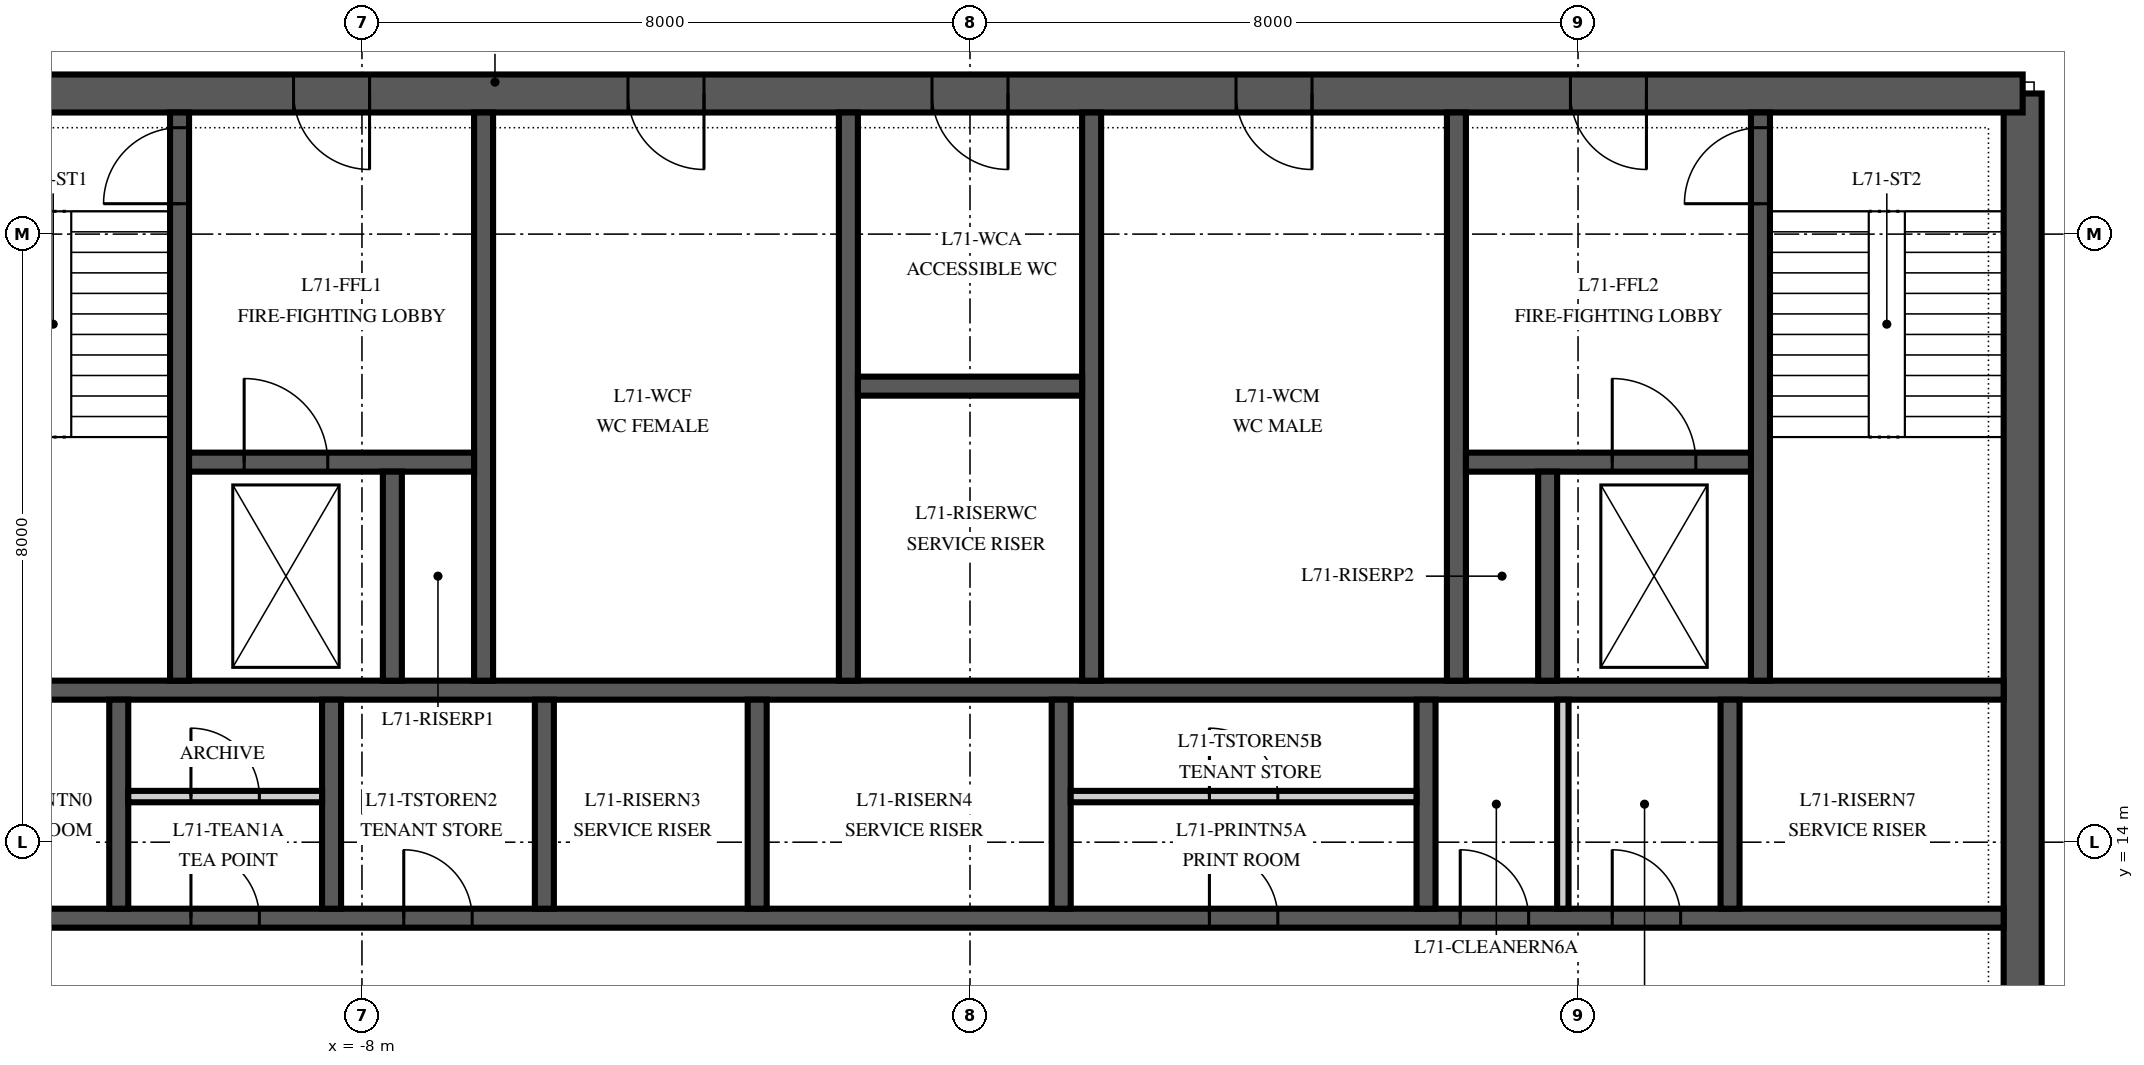
"""IFC4 building model, lengths in metres.
Left out: names, types, materials, properties, quantities, classifications, styles, units other than length and angle.
Written with IfcOpenShell. Run it as: python <this file> out.ifc"""

import sys

from ifc_helpers import new_model, si_unit, direction, frame, frame_2d, origin, place, context, subcontext, project, spatial, polyline, rectangle, outline, extrude, element, fill, save


model = new_model("IFC4")
c1 = context("Model", 3, precision=1e-05, world=origin(), true_north=direction((0.0, 1.0)))
c2 = subcontext(c1, "Body", "Model", "MODEL_VIEW")
j1 = project(units=[si_unit("LENGTHUNIT", "METRE"), si_unit("PLANEANGLEUNIT", "RADIAN")], contexts=[c1])
p1 = place(None, origin())
s1 = spatial("IfcSite", under=j1, at=p1, CompositionType="ELEMENT")
p2 = place(p1, origin())
s2 = spatial("IfcBuilding", under=s1, at=p2, CompositionType="ELEMENT")
p3 = place(p2, frame((0.0, 0.0, 304.0)))
s3 = spatial("IfcBuildingStorey", under=s2, at=p3, CompositionType="ELEMENT", Elevation=304.0)
p4 = place(p3, frame((13.85, 6.15, 0.0), z_axis=(0.0, 0.0, 1.0), x_axis=(0.0, 1.0, 0.0)))
e1 = element("IfcWall", 1, at=p4, inside=s3, PredefinedType="SHEAR", context=c2, shape_type="SweptSolid", body=[
    extrude(outline(polyline([(0.0, -0.25), (17.7, -0.25), (17.7, 0.0), (17.45, 0.0), (17.45, 0.25), (0.25, 0.25), (0.25, 0.0), (0.0, 0.0), (0.0, -0.25)])), origin(), (0.0, 0.0, 1.0), 4.0),
])
p5 = place(p4, frame((4.15, 0.0, 0.0)))
e2 = element("IfcOpeningElement", 2, at=p5, cuts=e1, PredefinedType="OPENING", context=c2, shape_type="SweptSolid", body=[
    extrude(rectangle(XDim=1.8, YDim=2.4, at=frame_2d((0.9, 1.2))), frame((0.0, 0.265, 0.0), z_axis=(0.0, -1.0, 0.0), x_axis=(1.0, 0.0, 0.0)), (0.0, 0.0, 1.0), 0.53),
])
p6 = place(p3, frame((13.85, 23.85, 0.0), z_axis=(0.0, 0.0, 1.0), x_axis=(-1.0, 0.0, 0.0)))
e3 = element("IfcWall", 3, at=p6, inside=s3, PredefinedType="SHEAR", context=c2, shape_type="SweptSolid", body=[
    extrude(rectangle(XDim=27.7, YDim=0.5, at=frame_2d((13.85, 0.0))), origin(), (0.0, 0.0, 1.0), 4.0),
])
p7 = place(p6, frame((21.75, 0.0, 0.0)))
e4 = element("IfcOpeningElement", 4, at=p7, cuts=e3, PredefinedType="OPENING", context=c2, shape_type="SweptSolid", body=[
    extrude(rectangle(XDim=1.0, YDim=2.1, at=frame_2d((0.5, 1.05))), frame((0.0, 0.265, 0.0), z_axis=(0.0, -1.0, 0.0), x_axis=(1.0, 0.0, 0.0)), (0.0, 0.0, 1.0), 0.53),
])
p8 = place(p6, frame((4.95, 0.0, 0.0)))
e5 = element("IfcOpeningElement", 5, at=p8, cuts=e3, PredefinedType="OPENING", context=c2, shape_type="SweptSolid", body=[
    extrude(rectangle(XDim=1.0, YDim=2.1, at=frame_2d((0.5, 1.05))), frame((0.0, 0.265, 0.0), z_axis=(0.0, -1.0, 0.0), x_axis=(1.0, 0.0, 0.0)), (0.0, 0.0, 1.0), 0.53),
])
p9 = place(p6, frame((17.35, 0.0, 0.0)))
e6 = element("IfcOpeningElement", 6, at=p9, cuts=e3, PredefinedType="OPENING", context=c2, shape_type="SweptSolid", body=[
    extrude(rectangle(XDim=1.0, YDim=2.1, at=frame_2d((0.5, 1.05))), frame((0.0, 0.265, 0.0), z_axis=(0.0, -1.0, 0.0), x_axis=(1.0, 0.0, 0.0)), (0.0, 0.0, 1.0), 0.53),
])
p10 = place(p6, frame((13.35, 0.0, 0.0)))
e7 = element("IfcOpeningElement", 7, at=p10, cuts=e3, PredefinedType="OPENING", context=c2, shape_type="SweptSolid", body=[
    extrude(rectangle(XDim=1.0, YDim=2.1, at=frame_2d((0.5, 1.05))), frame((0.0, 0.265, 0.0), z_axis=(0.0, -1.0, 0.0), x_axis=(1.0, 0.0, 0.0)), (0.0, 0.0, 1.0), 0.53),
])
p11 = place(p6, frame((9.35, 0.0, 0.0)))
e8 = element("IfcOpeningElement", 8, at=p11, cuts=e3, PredefinedType="OPENING", context=c2, shape_type="SweptSolid", body=[
    extrude(rectangle(XDim=1.0, YDim=2.1, at=frame_2d((0.5, 1.05))), frame((0.0, 0.265, 0.0), z_axis=(0.0, -1.0, 0.0), x_axis=(1.0, 0.0, 0.0)), (0.0, 0.0, 1.0), 0.53),
])
p12 = place(p3, frame((-13.6, 13.0, 0.0), z_axis=(0.0, 0.0, 1.0), x_axis=(1.0, 0.0, 0.0)))
e9 = element("IfcWall", 9, at=p12, inside=s3, PredefinedType="SHEAR", context=c2, shape_type="SweptSolid", body=[
    extrude(rectangle(XDim=27.2, YDim=0.25, at=frame_2d((13.6, 0.0))), origin(), (0.0, 0.0, 1.0), 4.0),
])
p13 = place(p12, frame((16.75, 0.0, 0.0)))
e10 = element("IfcOpeningElement", 10, at=p13, cuts=e9, PredefinedType="OPENING", context=c2, shape_type="SweptSolid", body=[
    extrude(rectangle(XDim=0.9, YDim=2.1, at=frame_2d((0.45, 1.05))), frame((0.0, 0.14, 0.0), z_axis=(0.0, -1.0, 0.0), x_axis=(1.0, 0.0, 0.0)), (0.0, 0.0, 1.0), 0.28),
])
p14 = place(p12, frame((20.05, 0.0, 0.0)))
e11 = element("IfcOpeningElement", 11, at=p14, cuts=e9, PredefinedType="OPENING", context=c2, shape_type="SweptSolid", body=[
    extrude(rectangle(XDim=0.9, YDim=2.1, at=frame_2d((0.45, 1.05))), frame((0.0, 0.14, 0.0), z_axis=(0.0, -1.0, 0.0), x_axis=(1.0, 0.0, 0.0)), (0.0, 0.0, 1.0), 0.28),
])
p15 = place(p12, frame((22.05, 0.0, 0.0)))
e12 = element("IfcOpeningElement", 12, at=p15, cuts=e9, PredefinedType="OPENING", context=c2, shape_type="SweptSolid", body=[
    extrude(rectangle(XDim=0.9, YDim=2.1, at=frame_2d((0.45, 1.05))), frame((0.0, 0.14, 0.0), z_axis=(0.0, -1.0, 0.0), x_axis=(1.0, 0.0, 0.0)), (0.0, 0.0, 1.0), 0.28),
])
p16 = place(p12, frame((0.55, 0.0, 0.0)))
e13 = element("IfcOpeningElement", 13, at=p16, cuts=e9, PredefinedType="OPENING", context=c2, shape_type="SweptSolid", body=[
    extrude(rectangle(XDim=0.9, YDim=2.1, at=frame_2d((0.45, 1.05))), frame((0.0, 0.14, 0.0), z_axis=(0.0, -1.0, 0.0), x_axis=(1.0, 0.0, 0.0)), (0.0, 0.0, 1.0), 0.28),
])
p17 = place(p12, frame((3.35, 0.0, 0.0)))
e14 = element("IfcOpeningElement", 14, at=p17, cuts=e9, PredefinedType="OPENING", context=c2, shape_type="SweptSolid", body=[
    extrude(rectangle(XDim=0.9, YDim=2.1, at=frame_2d((0.45, 1.05))), frame((0.0, 0.14, 0.0), z_axis=(0.0, -1.0, 0.0), x_axis=(1.0, 0.0, 0.0)), (0.0, 0.0, 1.0), 0.28),
])
p18 = place(p12, frame((6.15, 0.0, 0.0)))
e15 = element("IfcOpeningElement", 15, at=p18, cuts=e9, PredefinedType="OPENING", context=c2, shape_type="SweptSolid", body=[
    extrude(rectangle(XDim=0.9, YDim=2.1, at=frame_2d((0.45, 1.05))), frame((0.0, 0.14, 0.0), z_axis=(0.0, -1.0, 0.0), x_axis=(1.0, 0.0, 0.0)), (0.0, 0.0, 1.0), 0.28),
])
p19 = place(p3, frame((-13.6, 16.0, 0.0), z_axis=(0.0, 0.0, 1.0), x_axis=(1.0, 0.0, 0.0)))
e16 = element("IfcWall", 16, at=p19, inside=s3, PredefinedType="SHEAR", context=c2, shape_type="SweptSolid", body=[
    extrude(rectangle(XDim=27.2, YDim=0.25, at=frame_2d((13.6, 0.0))), origin(), (0.0, 0.0, 1.0), 4.0),
])
for number, where, z_axis, x_axis in (
    (17, (-11.2, 13.125, 0.0), (0.0, 0.0, 1.0), (0.0, 1.0, 0.0)),
    (18, (-8.4, 13.125, 0.0), (0.0, 0.0, 1.0), (0.0, 1.0, 0.0)),
    (19, (-5.6, 13.125, 0.0), (0.0, 0.0, 1.0), (0.0, 1.0, 0.0)),
    (20, (-2.8, 13.125, 0.0), (0.0, 0.0, 1.0), (0.0, 1.0, 0.0)),
    (21, (1.2, 13.125, 0.0), (0.0, 0.0, 1.0), (0.0, 1.0, 0.0)),
    (22, (6.0, 13.125, 0.0), (0.0, 0.0, 1.0), (0.0, 1.0, 0.0)),
    (23, (10.0, 13.125, 0.0), (0.0, 0.0, 1.0), (0.0, 1.0, 0.0)),
):
    element("IfcWall", number, at=place(p3, frame(where, z_axis=z_axis, x_axis=x_axis)), inside=s3, PredefinedType="SHEAR", context=c2, shape_type="SweptSolid", body=[
        extrude(rectangle(XDim=2.75, YDim=0.25, at=frame_2d((1.375, 0.0))), origin(), (0.0, 0.0, 1.0), 4.0),
    ])
p20 = place(p3, frame((-10.4, 16.125, 0.0), z_axis=(0.0, 0.0, 1.0), x_axis=(0.0, 1.0, 0.0)))
e24 = element("IfcWall", 24, at=p20, inside=s3, PredefinedType="SHEAR", context=c2, shape_type="SweptSolid", body=[
    extrude(rectangle(XDim=7.475, YDim=0.25, at=frame_2d((3.738, 0.0))), origin(), (0.0, 0.0, 1.0), 4.0),
])
p21 = place(p20, frame((6.275, 0.0, 0.0)))
e25 = element("IfcOpeningElement", 25, at=p21, cuts=e24, PredefinedType="OPENING", context=c2, shape_type="SweptSolid", body=[
    extrude(rectangle(XDim=1.0, YDim=2.1, at=frame_2d((0.5, 1.05))), frame((0.0, 0.14, 0.0), z_axis=(0.0, -1.0, 0.0), x_axis=(1.0, 0.0, 0.0)), (0.0, 0.0, 1.0), 0.28),
])
for number, where, z_axis, x_axis in (
    (26, (-6.4, 16.125, 0.0), (0.0, 0.0, 1.0), (0.0, 1.0, 0.0)),
    (27, (-1.6, 16.125, 0.0), (0.0, 0.0, 1.0), (0.0, 1.0, 0.0)),
    (28, (1.6, 16.125, 0.0), (0.0, 0.0, 1.0), (0.0, 1.0, 0.0)),
    (29, (6.4, 16.125, 0.0), (0.0, 0.0, 1.0), (0.0, 1.0, 0.0)),
):
    element("IfcWall", number, at=place(p3, frame(where, z_axis=z_axis, x_axis=x_axis)), inside=s3, PredefinedType="SHEAR", context=c2, shape_type="SweptSolid", body=[
        extrude(rectangle(XDim=7.475, YDim=0.25, at=frame_2d((3.738, 0.0))), origin(), (0.0, 0.0, 1.0), 4.0),
    ])
p22 = place(p3, frame((10.4, 16.125, 0.0), z_axis=(0.0, 0.0, 1.0), x_axis=(0.0, 1.0, 0.0)))
e30 = element("IfcWall", 30, at=p22, inside=s3, PredefinedType="SHEAR", context=c2, shape_type="SweptSolid", body=[
    extrude(rectangle(XDim=7.475, YDim=0.25, at=frame_2d((3.738, 0.0))), origin(), (0.0, 0.0, 1.0), 4.0),
])
p23 = place(p22, frame((6.275, 0.0, 0.0)))
e31 = element("IfcOpeningElement", 31, at=p23, cuts=e30, PredefinedType="OPENING", context=c2, shape_type="SweptSolid", body=[
    extrude(rectangle(XDim=1.0, YDim=2.1, at=frame_2d((0.5, 1.05))), frame((0.0, 0.14, 0.0), z_axis=(0.0, -1.0, 0.0), x_axis=(1.0, 0.0, 0.0)), (0.0, 0.0, 1.0), 0.28),
])
p24 = place(p3, frame((-10.275, 19.0, 0.0), z_axis=(0.0, 0.0, 1.0), x_axis=(1.0, 0.0, 0.0)))
e32 = element("IfcWall", 32, at=p24, inside=s3, PredefinedType="SHEAR", context=c2, shape_type="SweptSolid", body=[
    extrude(rectangle(XDim=3.75, YDim=0.25, at=frame_2d((1.875, 0.0))), origin(), (0.0, 0.0, 1.0), 4.0),
])
p25 = place(p24, frame((0.725, 0.0, 0.0)))
e33 = element("IfcOpeningElement", 33, at=p25, cuts=e32, PredefinedType="OPENING", context=c2, shape_type="SweptSolid", body=[
    extrude(rectangle(XDim=1.1, YDim=2.1, at=frame_2d((0.55, 1.05))), frame((0.0, 0.14, 0.0), z_axis=(0.0, -1.0, 0.0), x_axis=(1.0, 0.0, 0.0)), (0.0, 0.0, 1.0), 0.28),
])
p26 = place(p3, frame((6.525, 19.0, 0.0), z_axis=(0.0, 0.0, 1.0), x_axis=(1.0, 0.0, 0.0)))
e34 = element("IfcWall", 34, at=p26, inside=s3, PredefinedType="SHEAR", context=c2, shape_type="SweptSolid", body=[
    extrude(rectangle(XDim=3.75, YDim=0.25, at=frame_2d((1.875, 0.0))), origin(), (0.0, 0.0, 1.0), 4.0),
])
p27 = place(p26, frame((1.925, 0.0, 0.0)))
e35 = element("IfcOpeningElement", 35, at=p27, cuts=e34, PredefinedType="OPENING", context=c2, shape_type="SweptSolid", body=[
    extrude(rectangle(XDim=1.1, YDim=2.1, at=frame_2d((0.55, 1.05))), frame((0.0, 0.14, 0.0), z_axis=(0.0, -1.0, 0.0), x_axis=(1.0, 0.0, 0.0)), (0.0, 0.0, 1.0), 0.28),
])
for number, where, z_axis, x_axis in (
    (36, (-7.6, 16.125, 0.0), (0.0, 0.0, 1.0), (0.0, 1.0, 0.0)),
    (37, (7.6, 16.125, 0.0), (0.0, 0.0, 1.0), (0.0, 1.0, 0.0)),
):
    element("IfcWall", number, at=place(p3, frame(where, z_axis=z_axis, x_axis=x_axis)), inside=s3, PredefinedType="SHEAR", context=c2, shape_type="SweptSolid", body=[
        extrude(rectangle(XDim=2.75, YDim=0.25, at=frame_2d((1.375, 0.0))), origin(), (0.0, 0.0, 1.0), 4.0),
    ])
p28 = place(p3, frame((-1.475, 20.0, 0.0), z_axis=(0.0, 0.0, 1.0), x_axis=(1.0, 0.0, 0.0)))
e38 = element("IfcWall", 38, at=p28, inside=s3, PredefinedType="SHEAR", context=c2, shape_type="SweptSolid", body=[
    extrude(rectangle(XDim=2.95, YDim=0.25, at=frame_2d((1.475, 0.0))), origin(), (0.0, 0.0, 1.0), 4.0),
])
p29 = place(p3, frame((1.325, 14.6, 0.0), z_axis=(0.0, 0.0, 1.0), x_axis=(1.0, 0.0, 0.0)))
e39 = element("IfcWall", 39, at=p29, inside=s3, PredefinedType="PARTITIONING", context=c2, shape_type="SweptSolid", body=[
    extrude(rectangle(XDim=4.55, YDim=0.15, at=frame_2d((2.275, 0.0))), origin(), (0.0, 0.0, 1.0), 3.85),
])
p30 = place(p29, frame((1.825, 0.0, 0.0)))
e40 = element("IfcOpeningElement", 40, at=p30, cuts=e39, PredefinedType="OPENING", context=c2, shape_type="SweptSolid", body=[
    extrude(rectangle(XDim=0.9, YDim=2.1, at=frame_2d((0.45, 1.05))), frame((0.0, 0.09, 0.0), z_axis=(0.0, -1.0, 0.0), x_axis=(1.0, 0.0, 0.0)), (0.0, 0.0, 1.0), 0.18),
])
p31 = place(p3, frame((7.8, 13.125, 0.0), z_axis=(0.0, 0.0, 1.0), x_axis=(0.0, 1.0, 0.0)))
e41 = element("IfcWall", 41, at=p31, inside=s3, PredefinedType="PARTITIONING", context=c2, shape_type="SweptSolid", body=[
    extrude(rectangle(XDim=2.75, YDim=0.15, at=frame_2d((1.375, 0.0))), origin(), (0.0, 0.0, 1.0), 3.85),
])
p32 = place(p3, frame((-11.075, 14.6, 0.0), z_axis=(0.0, 0.0, 1.0), x_axis=(1.0, 0.0, 0.0)))
e42 = element("IfcWall", 42, at=p32, inside=s3, PredefinedType="PARTITIONING", context=c2, shape_type="SweptSolid", body=[
    extrude(rectangle(XDim=2.55, YDim=0.15, at=frame_2d((1.275, 0.0))), origin(), (0.0, 0.0, 1.0), 3.85),
])
p33 = place(p32, frame((0.825, 0.0, 0.0)))
e43 = element("IfcOpeningElement", 43, at=p33, cuts=e42, PredefinedType="OPENING", context=c2, shape_type="SweptSolid", body=[
    extrude(rectangle(XDim=0.9, YDim=2.1, at=frame_2d((0.45, 1.05))), frame((0.0, 0.09, 0.0), z_axis=(0.0, -1.0, 0.0), x_axis=(1.0, 0.0, 0.0)), (0.0, 0.0, 1.0), 0.18),
])
p34 = place(p7, origin())
e44 = element("IfcDoor", 44, at=p34, inside=s3, OperationType="SINGLE_SWING_RIGHT", PredefinedType="DOOR", context=c2, shape_type="SweptSolid", body=[
    extrude(rectangle(XDim=1.0, YDim=2.1, at=frame_2d((0.5, 1.05))), frame((0.0, 0.25, 0.0), z_axis=(0.0, -1.0, 0.0), x_axis=(1.0, 0.0, 0.0)), (0.0, 0.0, 1.0), 0.5),
])
fill(e4, e44)
p35 = place(p8, origin())
e45 = element("IfcDoor", 45, at=p35, inside=s3, OperationType="SINGLE_SWING_RIGHT", PredefinedType="DOOR", context=c2, shape_type="SweptSolid", body=[
    extrude(rectangle(XDim=1.0, YDim=2.1, at=frame_2d((0.5, 1.05))), frame((0.0, 0.25, 0.0), z_axis=(0.0, -1.0, 0.0), x_axis=(1.0, 0.0, 0.0)), (0.0, 0.0, 1.0), 0.5),
])
fill(e5, e45)
p36 = place(p9, origin())
e46 = element("IfcDoor", 46, at=p36, inside=s3, OperationType="SINGLE_SWING_LEFT", PredefinedType="DOOR", context=c2, shape_type="SweptSolid", body=[
    extrude(rectangle(XDim=1.0, YDim=2.1, at=frame_2d((0.5, 1.05))), frame((0.0, 0.25, 0.0), z_axis=(0.0, -1.0, 0.0), x_axis=(1.0, 0.0, 0.0)), (0.0, 0.0, 1.0), 0.5),
])
fill(e6, e46)
p37 = place(p10, origin())
e47 = element("IfcDoor", 47, at=p37, inside=s3, OperationType="SINGLE_SWING_LEFT", PredefinedType="DOOR", context=c2, shape_type="SweptSolid", body=[
    extrude(rectangle(XDim=1.0, YDim=2.1, at=frame_2d((0.5, 1.05))), frame((0.0, 0.25, 0.0), z_axis=(0.0, -1.0, 0.0), x_axis=(1.0, 0.0, 0.0)), (0.0, 0.0, 1.0), 0.5),
])
fill(e7, e47)
p38 = place(p11, origin())
e48 = element("IfcDoor", 48, at=p38, inside=s3, OperationType="SINGLE_SWING_LEFT", PredefinedType="DOOR", context=c2, shape_type="SweptSolid", body=[
    extrude(rectangle(XDim=1.0, YDim=2.1, at=frame_2d((0.5, 1.05))), frame((0.0, 0.25, 0.0), z_axis=(0.0, -1.0, 0.0), x_axis=(1.0, 0.0, 0.0)), (0.0, 0.0, 1.0), 0.5),
])
fill(e8, e48)
p39 = place(p21, origin())
e49 = element("IfcDoor", 49, at=p39, inside=s3, OperationType="SINGLE_SWING_LEFT", PredefinedType="DOOR", context=c2, shape_type="SweptSolid", body=[
    extrude(rectangle(XDim=1.0, YDim=2.1, at=frame_2d((0.5, 1.05))), frame((0.0, 0.125, 0.0), z_axis=(0.0, -1.0, 0.0), x_axis=(1.0, 0.0, 0.0)), (0.0, 0.0, 1.0), 0.25),
])
fill(e25, e49)
p40 = place(p23, origin())
e50 = element("IfcDoor", 50, at=p40, inside=s3, OperationType="SINGLE_SWING_LEFT", PredefinedType="DOOR", context=c2, shape_type="SweptSolid", body=[
    extrude(rectangle(XDim=1.0, YDim=2.1, at=frame_2d((0.5, 1.05))), frame((0.0, 0.125, 0.0), z_axis=(0.0, -1.0, 0.0), x_axis=(1.0, 0.0, 0.0)), (0.0, 0.0, 1.0), 0.25),
])
fill(e31, e50)
p41 = place(p27, origin())
e51 = element("IfcDoor", 51, at=p41, inside=s3, OperationType="SLIDING_TO_RIGHT", PredefinedType="DOOR", context=c2, shape_type="SweptSolid", body=[
    extrude(rectangle(XDim=1.1, YDim=2.1, at=frame_2d((0.55, 1.05))), frame((0.0, 0.125, 0.0), z_axis=(0.0, -1.0, 0.0), x_axis=(1.0, 0.0, 0.0)), (0.0, 0.0, 1.0), 0.25),
])
fill(e35, e51)
p42 = place(p25, origin())
e52 = element("IfcDoor", 52, at=p42, inside=s3, OperationType="SLIDING_TO_RIGHT", PredefinedType="DOOR", context=c2, shape_type="SweptSolid", body=[
    extrude(rectangle(XDim=1.1, YDim=2.1, at=frame_2d((0.55, 1.05))), frame((0.0, 0.125, 0.0), z_axis=(0.0, -1.0, 0.0), x_axis=(1.0, 0.0, 0.0)), (0.0, 0.0, 1.0), 0.25),
])
fill(e33, e52)
p43 = place(p13, origin())
e53 = element("IfcDoor", 53, at=p43, inside=s3, OperationType="SINGLE_SWING_LEFT", PredefinedType="DOOR", context=c2, shape_type="SweptSolid", body=[
    extrude(rectangle(XDim=0.9, YDim=2.1, at=frame_2d((0.45, 1.05))), frame((0.0, 0.125, 0.0), z_axis=(0.0, -1.0, 0.0), x_axis=(1.0, 0.0, 0.0)), (0.0, 0.0, 1.0), 0.25),
])
fill(e10, e53)
p44 = place(p30, origin())
e54 = element("IfcDoor", 54, at=p44, inside=s3, OperationType="SINGLE_SWING_LEFT", PredefinedType="DOOR", context=c2, shape_type="SweptSolid", body=[
    extrude(rectangle(XDim=0.9, YDim=2.1, at=frame_2d((0.45, 1.05))), frame((0.0, 0.075, 0.0), z_axis=(0.0, -1.0, 0.0), x_axis=(1.0, 0.0, 0.0)), (0.0, 0.0, 1.0), 0.149),
])
fill(e40, e54)
p45 = place(p14, origin())
e55 = element("IfcDoor", 55, at=p45, inside=s3, OperationType="SINGLE_SWING_LEFT", PredefinedType="DOOR", context=c2, shape_type="SweptSolid", body=[
    extrude(rectangle(XDim=0.9, YDim=2.1, at=frame_2d((0.45, 1.05))), frame((0.0, 0.125, 0.0), z_axis=(0.0, -1.0, 0.0), x_axis=(1.0, 0.0, 0.0)), (0.0, 0.0, 1.0), 0.25),
])
fill(e11, e55)
p46 = place(p15, origin())
e56 = element("IfcDoor", 56, at=p46, inside=s3, OperationType="SINGLE_SWING_LEFT", PredefinedType="DOOR", context=c2, shape_type="SweptSolid", body=[
    extrude(rectangle(XDim=0.9, YDim=2.1, at=frame_2d((0.45, 1.05))), frame((0.0, 0.125, 0.0), z_axis=(0.0, -1.0, 0.0), x_axis=(1.0, 0.0, 0.0)), (0.0, 0.0, 1.0), 0.25),
])
fill(e12, e56)
p47 = place(p17, origin())
e57 = element("IfcDoor", 57, at=p47, inside=s3, OperationType="SINGLE_SWING_LEFT", PredefinedType="DOOR", context=c2, shape_type="SweptSolid", body=[
    extrude(rectangle(XDim=0.9, YDim=2.1, at=frame_2d((0.45, 1.05))), frame((0.0, 0.125, 0.0), z_axis=(0.0, -1.0, 0.0), x_axis=(1.0, 0.0, 0.0)), (0.0, 0.0, 1.0), 0.25),
])
fill(e14, e57)
p48 = place(p33, origin())
e58 = element("IfcDoor", 58, at=p48, inside=s3, OperationType="SINGLE_SWING_LEFT", PredefinedType="DOOR", context=c2, shape_type="SweptSolid", body=[
    extrude(rectangle(XDim=0.9, YDim=2.1, at=frame_2d((0.45, 1.05))), frame((0.0, 0.075, 0.0), z_axis=(0.0, -1.0, 0.0), x_axis=(1.0, 0.0, 0.0)), (0.0, 0.0, 1.0), 0.149),
])
fill(e43, e58)
p49 = place(p18, origin())
e59 = element("IfcDoor", 59, at=p49, inside=s3, OperationType="SINGLE_SWING_LEFT", PredefinedType="DOOR", context=c2, shape_type="SweptSolid", body=[
    extrude(rectangle(XDim=0.9, YDim=2.1, at=frame_2d((0.45, 1.05))), frame((0.0, 0.125, 0.0), z_axis=(0.0, -1.0, 0.0), x_axis=(1.0, 0.0, 0.0)), (0.0, 0.0, 1.0), 0.25),
])
fill(e15, e59)
save(model, sys.argv[1])
